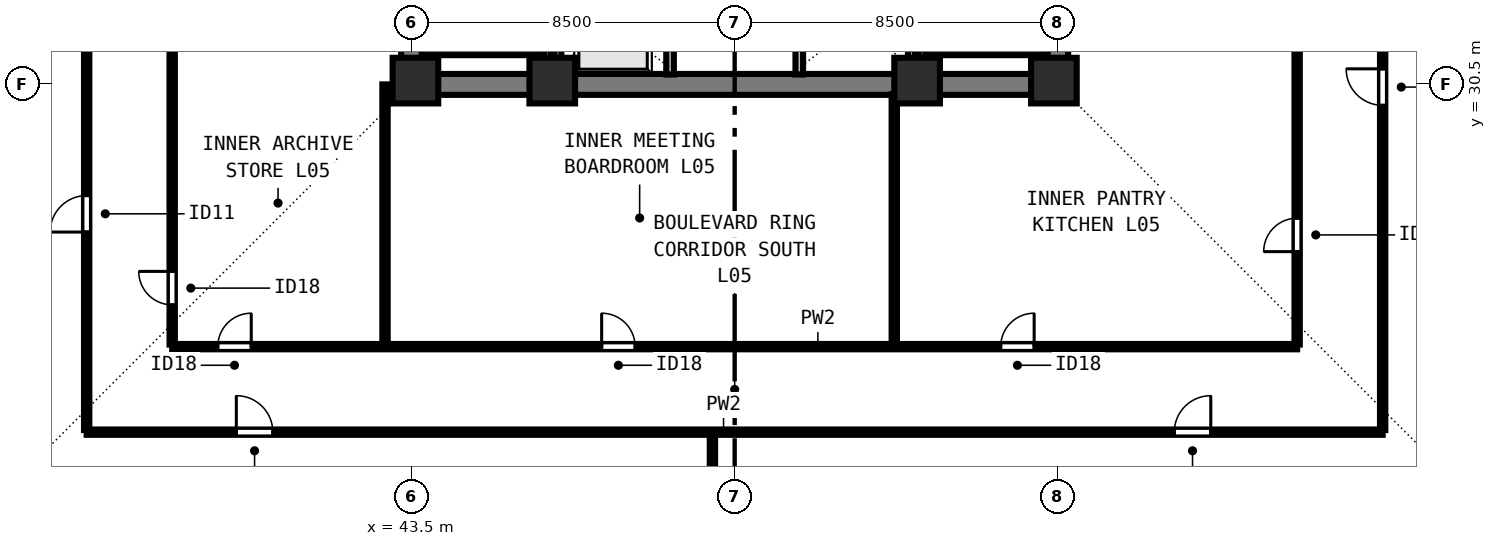
"""IFC4 building model, lengths in metres.
Left out: names, types, materials, properties, quantities, classifications, styles, units other than length and angle.
Written with IfcOpenShell. Run it as: python <this file> out.ifc"""

import sys

from ifc_helpers import new_model, si_unit, direction, frame, frame_2d, origin, origin_2d, place, context, subcontext, project, spatial, rectangle, extrude, element, fill, save


model = new_model("IFC4")
c1 = context("Model", 3, precision=1e-05, world=origin(), true_north=direction((0.0, 1.0)))
c2 = subcontext(c1, "Body", "Model", "MODEL_VIEW")
j1 = project(units=[si_unit("LENGTHUNIT", "METRE"), si_unit("PLANEANGLEUNIT", "RADIAN")], contexts=[c1])
p1 = place(None, origin())
s1 = spatial("IfcSite", under=j1, at=p1, CompositionType="ELEMENT")
p2 = place(p1, origin())
s2 = spatial("IfcBuilding", under=s1, at=p2, CompositionType="ELEMENT")
p3 = place(p2, frame((0.0, 0.0, 23.5)))
s3 = spatial("IfcBuildingStorey", under=s2, at=p3, CompositionType="ELEMENT", Elevation=23.5)
for number, where, z_axis, x_axis in (
    (1, (43.6, 30.6, 0.0), (0.0, 0.0, 1.0), (1.0, 0.0, 0.0)),
    (2, (47.2, 30.6, 0.0), (0.0, 0.0, 1.0), (1.0, 0.0, 0.0)),
    (3, (56.8, 30.6, 0.0), (0.0, 0.0, 1.0), (1.0, 0.0, 0.0)),
    (4, (60.4, 30.6, 0.0), (0.0, 0.0, 1.0), (1.0, 0.0, 0.0)),
):
    element("IfcColumn", number, at=place(p3, frame(where, z_axis=z_axis, x_axis=x_axis)), inside=s3, PredefinedType="COLUMN", context=c2, shape_type="SweptSolid", body=[
        extrude(rectangle(XDim=1.2, YDim=1.2, at=origin_2d()), origin(), (0.0, 0.0, 1.0), 3.5),
    ])
p4 = place(p3, frame((43.225, 30.5, 0.0), z_axis=(0.0, 0.0, 1.0), x_axis=(1.0, 0.0, 0.0)))
e5 = element("IfcWall", 5, at=p4, inside=s3, PredefinedType="SHEAR", context=c2, shape_type="SweptSolid", body=[
    extrude(rectangle(XDim=17.55, YDim=0.55, at=frame_2d((8.775, 0.0))), origin(), (0.0, 0.0, 1.0), 3.28),
])
for number, where, z_axis, x_axis in (
    (6, (43.5, 30.765, 0.0), (0.0, 0.0, 1.0), (0.0, 1.0, 0.0)),
    (7, (60.5, 30.765, 0.0), (0.0, 0.0, 1.0), (0.0, 1.0, 0.0)),
):
    element("IfcWall", number, at=place(p3, frame(where, z_axis=z_axis, x_axis=x_axis)), inside=s3, PredefinedType="SHEAR", context=c2, shape_type="SweptSolid", body=[
        extrude(rectangle(XDim=7.985, YDim=0.55, at=frame_2d((3.993, 0.0))), origin(), (0.0, 0.0, 1.0), 3.28),
    ])
p5 = place(p3, frame((50.3, 30.76, 0.0), z_axis=(0.0, 0.0, 1.0), x_axis=(0.0, 1.0, 0.0)))
e8 = element("IfcWall", 8, at=p5, inside=s3, PredefinedType="SOLIDWALL", context=c2, shape_type="SweptSolid", body=[
    extrude(rectangle(XDim=7.855, YDim=0.2, at=frame_2d((3.927, 0.0))), origin(), (0.0, 0.0, 1.0), 3.28),
])
p6 = place(p5, frame((0.79, 0.0, 0.0)))
e9 = element("IfcOpeningElement", 9, at=p6, cuts=e8, PredefinedType="OPENING", context=c2, shape_type="SweptSolid", body=[
    extrude(rectangle(XDim=1.1, YDim=2.2, at=frame_2d((0.55, 1.1))), frame((0.0, 0.11, 0.0), z_axis=(0.0, -1.0, 0.0), x_axis=(1.0, 0.0, 0.0)), (0.0, 0.0, 1.0), 0.22),
])
p7 = place(p5, frame((3.49, 0.0, 0.0)))
e10 = element("IfcOpeningElement", 10, at=p7, cuts=e8, PredefinedType="OPENING", context=c2, shape_type="SweptSolid", body=[
    extrude(rectangle(XDim=1.1, YDim=2.2, at=frame_2d((0.55, 1.1))), frame((0.0, 0.11, 0.0), z_axis=(0.0, -1.0, 0.0), x_axis=(1.0, 0.0, 0.0)), (0.0, 0.0, 1.0), 0.22),
])
p8 = place(p5, frame((6.19, 0.0, 0.0)))
e11 = element("IfcOpeningElement", 11, at=p8, cuts=e8, PredefinedType="OPENING", context=c2, shape_type="SweptSolid", body=[
    extrude(rectangle(XDim=1.1, YDim=2.2, at=frame_2d((0.55, 1.1))), frame((0.0, 0.11, 0.0), z_axis=(0.0, -1.0, 0.0), x_axis=(1.0, 0.0, 0.0)), (0.0, 0.0, 1.0), 0.22),
])
p9 = place(p3, frame((53.7, 30.76, 0.0), z_axis=(0.0, 0.0, 1.0), x_axis=(0.0, 1.0, 0.0)))
e12 = element("IfcWall", 12, at=p9, inside=s3, PredefinedType="SOLIDWALL", context=c2, shape_type="SweptSolid", body=[
    extrude(rectangle(XDim=7.855, YDim=0.2, at=frame_2d((3.927, 0.0))), origin(), (0.0, 0.0, 1.0), 3.28),
])
for number, where, z_axis, x_axis in (
    (13, (47.35, 30.76, 0.0), (0.0, 0.0, 1.0), (0.0, 1.0, 0.0)),
    (14, (56.65, 30.76, 0.0), (0.0, 0.0, 1.0), (0.0, 1.0, 0.0)),
):
    element("IfcWall", number, at=place(p3, frame(where, z_axis=z_axis, x_axis=x_axis)), inside=s3, PredefinedType="SOLIDWALL", context=c2, shape_type="SweptSolid", body=[
        extrude(rectangle(XDim=7.855, YDim=0.18, at=frame_2d((3.927, 0.0))), origin(), (0.0, 0.0, 1.0), 3.28),
    ])
p10 = place(p3, frame((34.95, 21.35, 0.0), z_axis=(0.0, 0.0, 1.0), x_axis=(1.0, 0.0, 0.0)))
e15 = element("IfcWall", 15, at=p10, inside=s3, PredefinedType="PARTITIONING", context=c2, shape_type="SweptSolid", body=[
    extrude(rectangle(XDim=34.1, YDim=0.14, at=frame_2d((17.05, 0.0))), origin(), (0.0, 0.0, 1.0), 3.28),
])
p11 = place(p10, frame((3.938, 0.0, 0.0)))
e16 = element("IfcOpeningElement", 16, at=p11, cuts=e15, PredefinedType="OPENING", context=c2, shape_type="SweptSolid", body=[
    extrude(rectangle(XDim=0.96, YDim=2.12, at=frame_2d((0.48, 1.06))), frame((0.0, 0.08, 0.0), z_axis=(0.0, -1.0, 0.0), x_axis=(1.0, 0.0, 0.0)), (0.0, 0.0, 1.0), 0.16),
])
p12 = place(p10, frame((28.617, 0.0, 0.0)))
e17 = element("IfcOpeningElement", 17, at=p12, cuts=e15, PredefinedType="OPENING", context=c2, shape_type="SweptSolid", body=[
    extrude(rectangle(XDim=0.96, YDim=2.12, at=frame_2d((0.48, 1.06))), frame((0.0, 0.08, 0.0), z_axis=(0.0, -1.0, 0.0), x_axis=(1.0, 0.0, 0.0)), (0.0, 0.0, 1.0), 0.16),
])
p13 = place(p3, frame((34.95, 21.405, 0.0), z_axis=(0.0, 0.0, 1.0), x_axis=(0.0, 1.0, 0.0)))
e18 = element("IfcWall", 18, at=p13, inside=s3, PredefinedType="PARTITIONING", context=c2, shape_type="SweptSolid", body=[
    extrude(rectangle(XDim=35.19, YDim=0.14, at=frame_2d((17.595, 0.0))), origin(), (0.0, 0.0, 1.0), 3.28),
])
p14 = place(p13, frame((5.21, 0.0, 0.0)))
e19 = element("IfcOpeningElement", 19, at=p14, cuts=e18, PredefinedType="OPENING", context=c2, shape_type="SweptSolid", body=[
    extrude(rectangle(XDim=0.96, YDim=2.12, at=frame_2d((0.48, 1.06))), frame((0.0, 0.08, 0.0), z_axis=(0.0, -1.0, 0.0), x_axis=(1.0, 0.0, 0.0)), (0.0, 0.0, 1.0), 0.16),
])
p15 = place(p13, frame((17.052, 0.0, 0.0)))
e20 = element("IfcOpeningElement", 20, at=p15, cuts=e18, PredefinedType="OPENING", context=c2, shape_type="SweptSolid", body=[
    extrude(rectangle(XDim=0.96, YDim=2.12, at=frame_2d((0.48, 1.06))), frame((0.0, 0.08, 0.0), z_axis=(0.0, -1.0, 0.0), x_axis=(1.0, 0.0, 0.0)), (0.0, 0.0, 1.0), 0.16),
])
p16 = place(p13, frame((28.957, 0.0, 0.0)))
e21 = element("IfcOpeningElement", 21, at=p16, cuts=e18, PredefinedType="OPENING", context=c2, shape_type="SweptSolid", body=[
    extrude(rectangle(XDim=0.96, YDim=2.12, at=frame_2d((0.48, 1.06))), frame((0.0, 0.08, 0.0), z_axis=(0.0, -1.0, 0.0), x_axis=(1.0, 0.0, 0.0)), (0.0, 0.0, 1.0), 0.16),
])
p17 = place(p3, frame((69.05, 21.405, 0.0), z_axis=(0.0, 0.0, 1.0), x_axis=(0.0, 1.0, 0.0)))
e22 = element("IfcWall", 22, at=p17, inside=s3, PredefinedType="PARTITIONING", context=c2, shape_type="SweptSolid", body=[
    extrude(rectangle(XDim=35.19, YDim=0.14, at=frame_2d((17.595, 0.0))), origin(), (0.0, 0.0, 1.0), 3.28),
])
p18 = place(p17, frame((8.545, 0.0, 0.0)))
e23 = element("IfcOpeningElement", 23, at=p18, cuts=e22, PredefinedType="OPENING", context=c2, shape_type="SweptSolid", body=[
    extrude(rectangle(XDim=0.96, YDim=2.12, at=frame_2d((0.48, 1.06))), frame((0.0, 0.08, 0.0), z_axis=(0.0, -1.0, 0.0), x_axis=(1.0, 0.0, 0.0)), (0.0, 0.0, 1.0), 0.16),
])
p19 = place(p17, frame((26.095, 0.0, 0.0)))
e24 = element("IfcOpeningElement", 24, at=p19, cuts=e22, PredefinedType="OPENING", context=c2, shape_type="SweptSolid", body=[
    extrude(rectangle(XDim=0.96, YDim=2.12, at=frame_2d((0.48, 1.06))), frame((0.0, 0.08, 0.0), z_axis=(0.0, -1.0, 0.0), x_axis=(1.0, 0.0, 0.0)), (0.0, 0.0, 1.0), 0.16),
])
p20 = place(p3, frame((37.2, 23.6, 0.0), z_axis=(0.0, 0.0, 1.0), x_axis=(1.0, 0.0, 0.0)))
e25 = element("IfcWall", 25, at=p20, inside=s3, PredefinedType="PARTITIONING", context=c2, shape_type="SweptSolid", body=[
    extrude(rectangle(XDim=29.6, YDim=0.14, at=frame_2d((14.8, 0.0))), origin(), (0.0, 0.0, 1.0), 3.28),
])
p21 = place(p20, frame((1.2, 0.0, 0.0)))
e26 = element("IfcOpeningElement", 26, at=p21, cuts=e25, PredefinedType="OPENING", context=c2, shape_type="SweptSolid", body=[
    extrude(rectangle(XDim=0.88, YDim=2.1, at=frame_2d((0.44, 1.05))), frame((0.0, 0.08, 0.0), z_axis=(0.0, -1.0, 0.0), x_axis=(1.0, 0.0, 0.0)), (0.0, 0.0, 1.0), 0.16),
])
p22 = place(p20, frame((11.3, 0.0, 0.0)))
e27 = element("IfcOpeningElement", 27, at=p22, cuts=e25, PredefinedType="OPENING", context=c2, shape_type="SweptSolid", body=[
    extrude(rectangle(XDim=0.88, YDim=2.1, at=frame_2d((0.44, 1.05))), frame((0.0, 0.08, 0.0), z_axis=(0.0, -1.0, 0.0), x_axis=(1.0, 0.0, 0.0)), (0.0, 0.0, 1.0), 0.16),
])
p23 = place(p20, frame((21.8, 0.0, 0.0)))
e28 = element("IfcOpeningElement", 28, at=p23, cuts=e25, PredefinedType="OPENING", context=c2, shape_type="SweptSolid", body=[
    extrude(rectangle(XDim=0.88, YDim=2.1, at=frame_2d((0.44, 1.05))), frame((0.0, 0.08, 0.0), z_axis=(0.0, -1.0, 0.0), x_axis=(1.0, 0.0, 0.0)), (0.0, 0.0, 1.0), 0.16),
])
p24 = place(p3, frame((37.2, 23.655, 0.0), z_axis=(0.0, 0.0, 1.0), x_axis=(0.0, 1.0, 0.0)))
e29 = element("IfcWall", 29, at=p24, inside=s3, PredefinedType="PARTITIONING", context=c2, shape_type="SweptSolid", body=[
    extrude(rectangle(XDim=15.095, YDim=0.14, at=frame_2d((7.547, 0.0))), origin(), (0.0, 0.0, 1.0), 3.28),
])
p25 = place(p24, frame((1.045, 0.0, 0.0)))
e30 = element("IfcOpeningElement", 30, at=p25, cuts=e29, PredefinedType="OPENING", context=c2, shape_type="SweptSolid", body=[
    extrude(rectangle(XDim=0.88, YDim=2.1, at=frame_2d((0.44, 1.05))), frame((0.0, 0.08, 0.0), z_axis=(0.0, -1.0, 0.0), x_axis=(1.0, 0.0, 0.0)), (0.0, 0.0, 1.0), 0.16),
])
p26 = place(p24, frame((12.145, 0.0, 0.0)))
e31 = element("IfcOpeningElement", 31, at=p26, cuts=e29, PredefinedType="OPENING", context=c2, shape_type="SweptSolid", body=[
    extrude(rectangle(XDim=0.88, YDim=2.1, at=frame_2d((0.44, 1.05))), frame((0.0, 0.08, 0.0), z_axis=(0.0, -1.0, 0.0), x_axis=(1.0, 0.0, 0.0)), (0.0, 0.0, 1.0), 0.16),
])
p27 = place(p3, frame((66.8, 23.655, 0.0), z_axis=(0.0, 0.0, 1.0), x_axis=(0.0, 1.0, 0.0)))
e32 = element("IfcWall", 32, at=p27, inside=s3, PredefinedType="PARTITIONING", context=c2, shape_type="SweptSolid", body=[
    extrude(rectangle(XDim=15.095, YDim=0.14, at=frame_2d((7.547, 0.0))), origin(), (0.0, 0.0, 1.0), 3.28),
])
p28 = place(p27, frame((2.445, 0.0, 0.0)))
e33 = element("IfcOpeningElement", 33, at=p28, cuts=e32, PredefinedType="OPENING", context=c2, shape_type="SweptSolid", body=[
    extrude(rectangle(XDim=0.88, YDim=2.1, at=frame_2d((0.44, 1.05))), frame((0.0, 0.08, 0.0), z_axis=(0.0, -1.0, 0.0), x_axis=(1.0, 0.0, 0.0)), (0.0, 0.0, 1.0), 0.16),
])
p29 = place(p3, frame((42.8, 23.655, 0.0), z_axis=(0.0, 0.0, 1.0), x_axis=(0.0, 1.0, 0.0)))
e34 = element("IfcWall", 34, at=p29, inside=s3, PredefinedType="PARTITIONING", context=c2, shape_type="SweptSolid", body=[
    extrude(rectangle(XDim=6.845, YDim=0.14, at=frame_2d((3.422, 0.0))), origin(), (0.0, 0.0, 1.0), 2.439),
])
p30 = place(p3, frame((56.2, 23.655, 0.0), z_axis=(0.0, 0.0, 1.0), x_axis=(0.0, 1.0, 0.0)))
e35 = element("IfcWall", 35, at=p30, inside=s3, PredefinedType="PARTITIONING", context=c2, shape_type="SweptSolid", body=[
    extrude(rectangle(XDim=6.585, YDim=0.14, at=frame_2d((3.292, 0.0))), origin(), (0.0, 0.0, 1.0), 2.849),
])
p31 = place(p3, frame((51.415, 13.92, 0.0), z_axis=(0.0, 0.0, 1.0), x_axis=(0.0, 1.0, 0.0)))
e36 = element("IfcWall", 36, at=p31, inside=s3, PredefinedType="PARTITIONING", context=c2, shape_type="SweptSolid", body=[
    extrude(rectangle(XDim=7.33, YDim=0.14, at=frame_2d((3.665, 0.0))), origin(), (0.0, 0.0, 1.0), 2.849),
])
p32 = place(p3, frame((43.765, 31.36, 0.0), z_axis=(0.0, 0.0, 1.0), x_axis=(1.0, 0.0, 0.0)))
e37 = element("IfcWall", 37, at=p32, inside=s3, PredefinedType="SOLIDWALL", context=c2, shape_type="SweptSolid", body=[
    extrude(rectangle(XDim=3.23, YDim=0.18, at=frame_2d((1.615, 0.0))), origin(), (0.0, 0.0, 1.0), 3.28),
])
p33 = place(p3, frame((47.07, 38.78, 0.0), z_axis=(0.0, 0.0, 1.0), x_axis=(0.0, -1.0, 0.0)))
e38 = element("IfcWall", 38, at=p33, inside=s3, PredefinedType="SOLIDWALL", context=c2, shape_type="SweptSolid", body=[
    extrude(rectangle(XDim=8.017, YDim=0.18, at=frame_2d((4.009, 0.0))), origin(), (0.0, 0.0, 1.0), 3.28),
])
p34 = place(p3, frame((57.005, 31.36, 0.0), z_axis=(0.0, 0.0, 1.0), x_axis=(1.0, 0.0, 0.0)))
e39 = element("IfcWall", 39, at=p34, inside=s3, PredefinedType="SOLIDWALL", context=c2, shape_type="SweptSolid", body=[
    extrude(rectangle(XDim=3.23, YDim=0.18, at=frame_2d((1.615, 0.0))), origin(), (0.0, 0.0, 1.0), 3.28),
])
p35 = place(p3, frame((56.93, 38.78, 0.0), z_axis=(0.0, 0.0, 1.0), x_axis=(0.0, -1.0, 0.0)))
e40 = element("IfcWall", 40, at=p35, inside=s3, PredefinedType="SOLIDWALL", context=c2, shape_type="SweptSolid", body=[
    extrude(rectangle(XDim=8.017, YDim=0.18, at=frame_2d((4.009, 0.0))), origin(), (0.0, 0.0, 1.0), 3.28),
])
p36 = place(p21, origin())
e41 = element("IfcDoor", 41, at=p36, inside=s3, OperationType="SINGLE_SWING_RIGHT", PredefinedType="DOOR", context=c2, shape_type="SweptSolid", body=[
    extrude(rectangle(XDim=0.88, YDim=2.1, at=frame_2d((0.44, 1.05))), frame((0.0, 0.025, 0.0), z_axis=(0.0, -1.0, 0.0), x_axis=(1.0, 0.0, 0.0)), (0.0, 0.0, 1.0), 0.05),
])
fill(e26, e41)
p37 = place(p22, origin())
e42 = element("IfcDoor", 42, at=p37, inside=s3, OperationType="SINGLE_SWING_LEFT", PredefinedType="DOOR", context=c2, shape_type="SweptSolid", body=[
    extrude(rectangle(XDim=0.88, YDim=2.1, at=frame_2d((0.44, 1.05))), frame((0.0, 0.025, 0.0), z_axis=(0.0, -1.0, 0.0), x_axis=(1.0, 0.0, 0.0)), (0.0, 0.0, 1.0), 0.05),
])
fill(e27, e42)
p38 = place(p23, origin())
e43 = element("IfcDoor", 43, at=p38, inside=s3, OperationType="SINGLE_SWING_RIGHT", PredefinedType="DOOR", context=c2, shape_type="SweptSolid", body=[
    extrude(rectangle(XDim=0.88, YDim=2.1, at=frame_2d((0.44, 1.05))), frame((0.0, 0.025, 0.0), z_axis=(0.0, -1.0, 0.0), x_axis=(1.0, 0.0, 0.0)), (0.0, 0.0, 1.0), 0.05),
])
fill(e28, e43)
p39 = place(p25, origin())
e44 = element("IfcDoor", 44, at=p39, inside=s3, OperationType="SINGLE_SWING_RIGHT", PredefinedType="DOOR", context=c2, shape_type="SweptSolid", body=[
    extrude(rectangle(XDim=0.88, YDim=2.1, at=frame_2d((0.44, 1.05))), frame((0.0, 0.025, 0.0), z_axis=(0.0, -1.0, 0.0), x_axis=(1.0, 0.0, 0.0)), (0.0, 0.0, 1.0), 0.05),
])
fill(e30, e44)
p40 = place(p28, origin())
e45 = element("IfcDoor", 45, at=p40, inside=s3, OperationType="SINGLE_SWING_LEFT", PredefinedType="DOOR", context=c2, shape_type="SweptSolid", body=[
    extrude(rectangle(XDim=0.88, YDim=2.1, at=frame_2d((0.44, 1.05))), frame((0.0, 0.025, 0.0), z_axis=(0.0, -1.0, 0.0), x_axis=(1.0, 0.0, 0.0)), (0.0, 0.0, 1.0), 0.05),
])
fill(e33, e45)
p41 = place(p11, origin())
e46 = element("IfcDoor", 46, at=p41, inside=s3, OperationType="SINGLE_SWING_LEFT", PredefinedType="DOOR", context=c2, shape_type="SweptSolid", body=[
    extrude(rectangle(XDim=0.96, YDim=2.12, at=frame_2d((0.48, 1.06))), frame((0.0, 0.025, 0.0), z_axis=(0.0, -1.0, 0.0), x_axis=(1.0, 0.0, 0.0)), (0.0, 0.0, 1.0), 0.05),
])
fill(e16, e46)
p42 = place(p12, origin())
e47 = element("IfcDoor", 47, at=p42, inside=s3, OperationType="SINGLE_SWING_RIGHT", PredefinedType="DOOR", context=c2, shape_type="SweptSolid", body=[
    extrude(rectangle(XDim=0.96, YDim=2.12, at=frame_2d((0.48, 1.06))), frame((0.0, 0.025, 0.0), z_axis=(0.0, -1.0, 0.0), x_axis=(1.0, 0.0, 0.0)), (0.0, 0.0, 1.0), 0.05),
])
fill(e17, e47)
p43 = place(p14, origin())
e48 = element("IfcDoor", 48, at=p43, inside=s3, OperationType="SINGLE_SWING_LEFT", PredefinedType="DOOR", context=c2, shape_type="SweptSolid", body=[
    extrude(rectangle(XDim=0.96, YDim=2.12, at=frame_2d((0.48, 1.06))), frame((0.0, 0.025, 0.0), z_axis=(0.0, -1.0, 0.0), x_axis=(1.0, 0.0, 0.0)), (0.0, 0.0, 1.0), 0.05),
])
fill(e19, e48)
p44 = place(p18, origin())
e49 = element("IfcDoor", 49, at=p44, inside=s3, OperationType="SINGLE_SWING_RIGHT", PredefinedType="DOOR", context=c2, shape_type="SweptSolid", body=[
    extrude(rectangle(XDim=0.96, YDim=2.12, at=frame_2d((0.48, 1.06))), frame((0.0, 0.025, 0.0), z_axis=(0.0, -1.0, 0.0), x_axis=(1.0, 0.0, 0.0)), (0.0, 0.0, 1.0), 0.05),
])
fill(e23, e49)
save(model, sys.argv[1])
